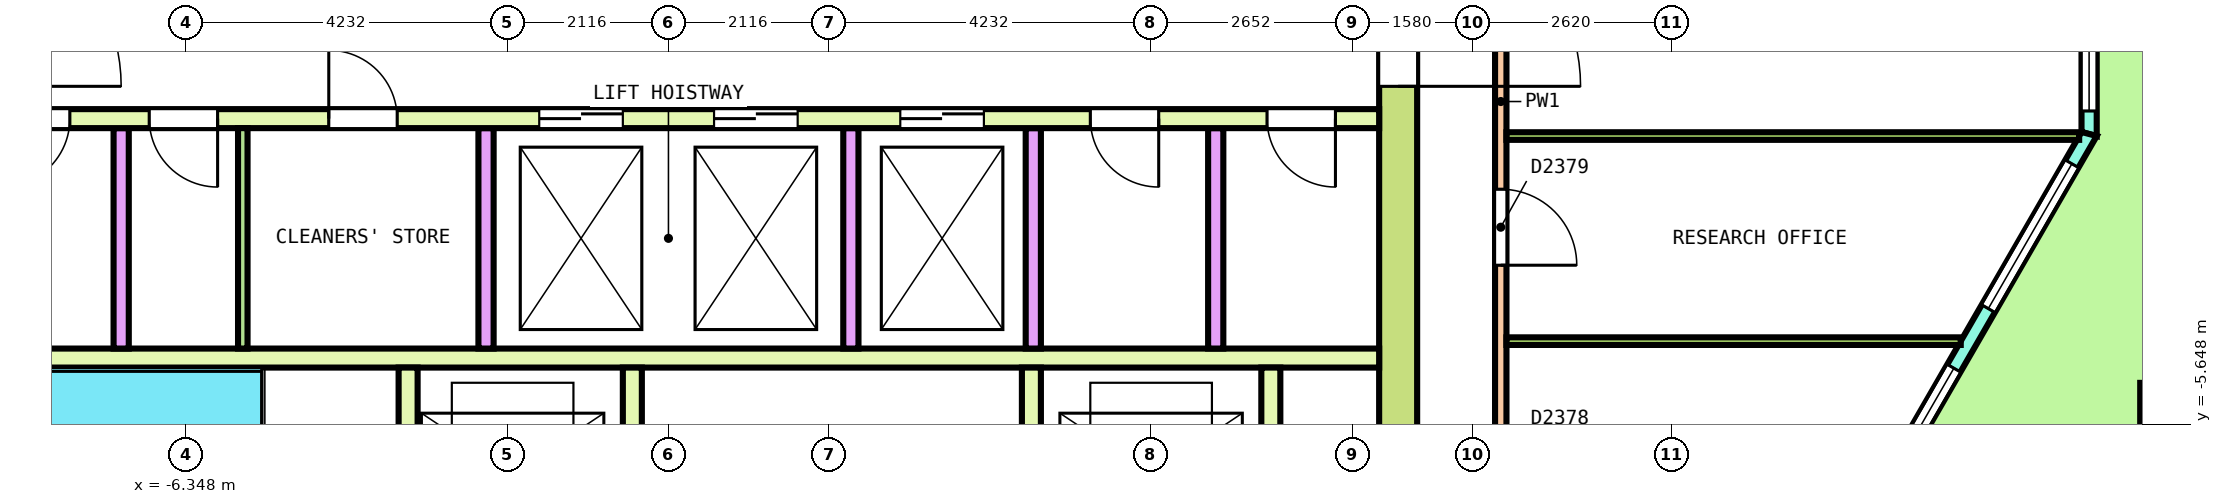
"""IFC4 building model, lengths in metres.
Left out: names, types, materials, properties, quantities, classifications, styles, units other than length and angle.
Written with IfcOpenShell. Run it as: python <this file> out.ifc"""

import sys

from ifc_helpers import new_model, si_unit, direction, frame, frame_2d, origin, origin_2d, place, context, subcontext, project, spatial, polyline, rectangle, outline, extrude, element, fill, save


model = new_model("IFC4")
c1 = context("Model", 3, precision=1e-05, world=origin(), true_north=direction((0.0, 1.0)))
c2 = subcontext(c1, "Body", "Model", "MODEL_VIEW")
j1 = project(units=[si_unit("LENGTHUNIT", "METRE"), si_unit("PLANEANGLEUNIT", "RADIAN")], contexts=[c1])
p1 = place(None, origin())
s1 = spatial("IfcSite", under=j1, at=p1, CompositionType="ELEMENT")
p2 = place(p1, origin())
s2 = spatial("IfcBuilding", under=s1, at=p2, CompositionType="ELEMENT")
p3 = place(p2, frame((0.0, 0.0, 328.6)))
s3 = spatial("IfcBuildingStorey", under=s2, at=p3, CompositionType="ELEMENT", Elevation=328.6)
p4 = place(p3, frame((19.788, -5.527, 0.0), z_axis=(0.010833557325, 0.018858414602, 0.999763469144), x_axis=(0.498285075857, 0.866740432575, -0.0217486946)))
e1 = element("IfcColumn", 1, at=p4, inside=s3, PredefinedType="COLUMN", context=c2, shape_type="SweptSolid", body=[
    extrude(rectangle(XDim=0.85, YDim=0.85, at=origin_2d()), origin(), (0.0, 0.0, 1.0), 3.651),
])
p5 = place(p3, frame((18.69, -1.827, 0.0), z_axis=(0.0, 0.0, 1.0), x_axis=(0.0, 1.0, 0.0)))
e2 = element("IfcWall", 2, at=p5, inside=s3, PredefinedType="SOLIDWALL", context=c2, shape_type="SweptSolid", body=[
    extrude(outline(polyline([(-0.027, -0.1), (1.214, -0.1), (2.456, -0.1), (3.697, -0.1), (4.938, -0.1), (4.885, 0.1), (3.67, 0.1), (2.456, 0.1), (1.241, 0.1), (0.027, 0.1), (-0.027, -0.1)])), origin(), (0.0, 0.0, 1.0), 3.7),
])
p6 = place(p5, frame((0.303, 0.0, 0.1)))
e3 = element("IfcOpeningElement", 3, at=p6, cuts=e2, PredefinedType="OPENING", context=c2, shape_type="SweptSolid", body=[
    extrude(rectangle(XDim=1.85, YDim=2.9, at=frame_2d((0.925, 1.45))), frame((0.0, 0.11, 0.0), z_axis=(0.0, -1.0, 0.0), x_axis=(1.0, 0.0, 0.0)), (0.0, 0.0, 1.0), 0.22),
])
p7 = place(p5, frame((2.759, 0.0, 0.1)))
e4 = element("IfcOpeningElement", 4, at=p7, cuts=e2, PredefinedType="OPENING", context=c2, shape_type="SweptSolid", body=[
    extrude(rectangle(XDim=1.85, YDim=2.9, at=frame_2d((0.925, 1.45))), frame((0.0, 0.11, 0.0), z_axis=(0.0, -1.0, 0.0), x_axis=(1.0, 0.0, 0.0)), (0.0, 0.0, 1.0), 0.22),
])
p8 = place(p3, frame((10.928, -15.273, 0.0), z_axis=(0.0, 0.0, 1.0), x_axis=(0.500001957507, 0.866024273614, 0.0)))
e5 = element("IfcWall", 5, at=p8, inside=s3, PredefinedType="SOLIDWALL", context=c2, shape_type="SweptSolid", body=[
    extrude(outline(polyline([(-0.027, -0.1), (1.012, -0.1), (2.05, -0.1), (3.089, -0.1), (4.128, -0.1), (5.166, -0.1), (6.205, -0.1), (7.243, -0.1), (8.282, -0.1), (9.321, -0.1), (10.359, -0.1), (11.398, -0.1), (12.437, -0.1), (13.475, -0.1), (14.514, -0.1), (15.552, -0.1), (15.499, 0.1), (14.467, 0.1), (13.436, 0.1), (12.404, 0.1), (11.373, 0.1), (10.341, 0.1), (9.31, 0.1), (8.278, 0.1), (7.247, 0.1), (6.216, 0.1), (5.184, 0.1), (4.153, 0.1), (3.121, 0.1), (2.09, 0.1), (1.058, 0.1), (0.027, 0.1), (-0.027, -0.1)])), origin(), (0.0, 0.0, 1.0), 3.7),
])
p9 = place(p8, frame((0.452, 0.0, 0.1)))
e6 = element("IfcOpeningElement", 6, at=p9, cuts=e5, PredefinedType="OPENING", context=c2, shape_type="SweptSolid", body=[
    extrude(rectangle(XDim=2.2, YDim=2.9, at=frame_2d((1.1, 1.45))), frame((0.0, 0.11, 0.0), z_axis=(0.0, -1.0, 0.0), x_axis=(1.0, 0.0, 0.0)), (0.0, 0.0, 1.0), 0.22),
])
p10 = place(p8, frame((3.558, 0.0, 0.1)))
e7 = element("IfcOpeningElement", 7, at=p10, cuts=e5, PredefinedType="OPENING", context=c2, shape_type="SweptSolid", body=[
    extrude(rectangle(XDim=2.2, YDim=2.9, at=frame_2d((1.1, 1.45))), frame((0.0, 0.11, 0.0), z_axis=(0.0, -1.0, 0.0), x_axis=(1.0, 0.0, 0.0)), (0.0, 0.0, 1.0), 0.22),
])
p11 = place(p8, frame((6.863, 0.0, 0.0)))
e8 = element("IfcOpeningElement", 8, at=p11, cuts=e5, PredefinedType="OPENING", context=c2, shape_type="SweptSolid", body=[
    extrude(rectangle(XDim=1.8, YDim=2.4, at=frame_2d((0.9, 1.2))), frame((0.0, 0.11, 0.0), z_axis=(0.0, -1.0, 0.0), x_axis=(1.0, 0.0, 0.0)), (0.0, 0.0, 1.0), 0.22),
])
p12 = place(p8, frame((6.863, 0.0, 2.55)))
e9 = element("IfcOpeningElement", 9, at=p12, cuts=e5, PredefinedType="OPENING", context=c2, shape_type="SweptSolid", body=[
    extrude(rectangle(XDim=1.8, YDim=0.45, at=frame_2d((0.9, 0.225))), frame((0.0, 0.11, 0.0), z_axis=(0.0, -1.0, 0.0), x_axis=(1.0, 0.0, 0.0)), (0.0, 0.0, 1.0), 0.22),
])
p13 = place(p8, frame((9.768, 0.0, 0.1)))
e10 = element("IfcOpeningElement", 10, at=p13, cuts=e5, PredefinedType="OPENING", context=c2, shape_type="SweptSolid", body=[
    extrude(rectangle(XDim=2.2, YDim=2.9, at=frame_2d((1.1, 1.45))), frame((0.0, 0.11, 0.0), z_axis=(0.0, -1.0, 0.0), x_axis=(1.0, 0.0, 0.0)), (0.0, 0.0, 1.0), 0.22),
])
p14 = place(p8, frame((12.873, 0.0, 0.1)))
e11 = element("IfcOpeningElement", 11, at=p14, cuts=e5, PredefinedType="OPENING", context=c2, shape_type="SweptSolid", body=[
    extrude(rectangle(XDim=2.2, YDim=2.9, at=frame_2d((1.1, 1.45))), frame((0.0, 0.11, 0.0), z_axis=(0.0, -1.0, 0.0), x_axis=(1.0, 0.0, 0.0)), (0.0, 0.0, 1.0), 0.22),
])
p15 = place(p3, frame((9.6, -7.85, 0.0), z_axis=(0.0, 0.0, 1.0), x_axis=(0.0, 1.0, 0.0)))
e12 = element("IfcWall", 12, at=p15, inside=s3, PredefinedType="SHEAR", context=c2, shape_type="SweptSolid", body=[
    extrude(rectangle(XDim=15.7, YDim=0.5, at=frame_2d((7.85, 0.0))), origin(), (0.0, 0.0, 1.0), 3.7),
])
p16 = place(p15, frame((6.65, 0.0, 0.0)))
e13 = element("IfcOpeningElement", 13, at=p16, cuts=e12, PredefinedType="OPENING", context=c2, shape_type="SweptSolid", body=[
    extrude(rectangle(XDim=2.4, YDim=2.1, at=frame_2d((1.2, 1.05))), frame((0.0, 0.26, 0.0), z_axis=(0.0, -1.0, 0.0), x_axis=(1.0, 0.0, 0.0)), (0.0, 0.0, 1.0), 0.52),
])
p17 = place(p15, frame((13.55, 0.0, 0.0)))
e14 = element("IfcOpeningElement", 14, at=p17, cuts=e12, PredefinedType="OPENING", context=c2, shape_type="SweptSolid", body=[
    extrude(rectangle(XDim=1.2, YDim=2.1, at=frame_2d((0.6, 1.05))), frame((0.0, 0.26, 0.0), z_axis=(0.0, -1.0, 0.0), x_axis=(1.0, 0.0, 0.0)), (0.0, 0.0, 1.0), 0.52),
])
p18 = place(p15, frame((1.05, 0.0, 0.0)))
e15 = element("IfcOpeningElement", 15, at=p18, cuts=e12, PredefinedType="OPENING", context=c2, shape_type="SweptSolid", body=[
    extrude(rectangle(XDim=1.0, YDim=2.1, at=frame_2d((0.5, 1.05))), frame((0.0, 0.26, 0.0), z_axis=(0.0, -1.0, 0.0), x_axis=(1.0, 0.0, 0.0)), (0.0, 0.0, 1.0), 0.52),
])
p19 = place(p3, frame((-9.35, -1.625, 0.0), z_axis=(0.0, 0.0, 1.0), x_axis=(1.0, 0.0, 0.0)))
e16 = element("IfcWall", 16, at=p19, inside=s3, PredefinedType="SOLIDWALL", context=c2, shape_type="SweptSolid", body=[
    extrude(rectangle(XDim=18.7, YDim=0.25, at=frame_2d((9.35, 0.0))), origin(), (0.0, 0.0, 1.0), 3.7),
])
p20 = place(p19, frame((7.65, 0.0, 0.0)))
e17 = element("IfcOpeningElement", 17, at=p20, cuts=e16, PredefinedType="OPENING", context=c2, shape_type="SweptSolid", body=[
    extrude(rectangle(XDim=1.1, YDim=2.1, at=frame_2d((0.55, 1.05))), frame((0.0, 0.135, 0.0), z_axis=(0.0, -1.0, 0.0), x_axis=(1.0, 0.0, 0.0)), (0.0, 0.0, 1.0), 0.27),
])
p21 = place(p19, frame((9.95, 0.0, 0.0)))
e18 = element("IfcOpeningElement", 18, at=p21, cuts=e16, PredefinedType="OPENING", context=c2, shape_type="SweptSolid", body=[
    extrude(rectangle(XDim=1.1, YDim=2.1, at=frame_2d((0.55, 1.05))), frame((0.0, 0.135, 0.0), z_axis=(0.0, -1.0, 0.0), x_axis=(1.0, 0.0, 0.0)), (0.0, 0.0, 1.0), 0.27),
])
p22 = place(p19, frame((12.4, 0.0, 0.0)))
e19 = element("IfcOpeningElement", 19, at=p22, cuts=e16, PredefinedType="OPENING", context=c2, shape_type="SweptSolid", body=[
    extrude(rectangle(XDim=1.1, YDim=2.1, at=frame_2d((0.55, 1.05))), frame((0.0, 0.135, 0.0), z_axis=(0.0, -1.0, 0.0), x_axis=(1.0, 0.0, 0.0)), (0.0, 0.0, 1.0), 0.27),
])
p23 = place(p19, frame((0.575, 0.0, 0.0)))
e20 = element("IfcOpeningElement", 20, at=p23, cuts=e16, PredefinedType="OPENING", context=c2, shape_type="SweptSolid", body=[
    extrude(rectangle(XDim=0.9, YDim=2.1, at=frame_2d((0.45, 1.05))), frame((0.0, 0.135, 0.0), z_axis=(0.0, -1.0, 0.0), x_axis=(1.0, 0.0, 0.0)), (0.0, 0.0, 1.0), 0.27),
])
p24 = place(p19, frame((2.519, 0.0, 0.0)))
e21 = element("IfcOpeningElement", 21, at=p24, cuts=e16, PredefinedType="OPENING", context=c2, shape_type="SweptSolid", body=[
    extrude(rectangle(XDim=0.9, YDim=2.1, at=frame_2d((0.45, 1.05))), frame((0.0, 0.135, 0.0), z_axis=(0.0, -1.0, 0.0), x_axis=(1.0, 0.0, 0.0)), (0.0, 0.0, 1.0), 0.27),
])
p25 = place(p19, frame((4.881, 0.0, 0.0)))
e22 = element("IfcOpeningElement", 22, at=p25, cuts=e16, PredefinedType="OPENING", context=c2, shape_type="SweptSolid", body=[
    extrude(rectangle(XDim=0.9, YDim=2.1, at=frame_2d((0.45, 1.05))), frame((0.0, 0.135, 0.0), z_axis=(0.0, -1.0, 0.0), x_axis=(1.0, 0.0, 0.0)), (0.0, 0.0, 1.0), 0.27),
])
p26 = place(p19, frame((14.9, 0.0, 0.0)))
e23 = element("IfcOpeningElement", 23, at=p26, cuts=e16, PredefinedType="OPENING", context=c2, shape_type="SweptSolid", body=[
    extrude(rectangle(XDim=0.9, YDim=2.1, at=frame_2d((0.45, 1.05))), frame((0.0, 0.135, 0.0), z_axis=(0.0, -1.0, 0.0), x_axis=(1.0, 0.0, 0.0)), (0.0, 0.0, 1.0), 0.27),
])
p27 = place(p19, frame((17.225, 0.0, 0.0)))
e24 = element("IfcOpeningElement", 24, at=p27, cuts=e16, PredefinedType="OPENING", context=c2, shape_type="SweptSolid", body=[
    extrude(rectangle(XDim=0.9, YDim=2.1, at=frame_2d((0.45, 1.05))), frame((0.0, 0.135, 0.0), z_axis=(0.0, -1.0, 0.0), x_axis=(1.0, 0.0, 0.0)), (0.0, 0.0, 1.0), 0.27),
])
p28 = place(p3, frame((-9.35, -4.775, 0.0), z_axis=(0.0, 0.0, 1.0), x_axis=(1.0, 0.0, 0.0)))
e25 = element("IfcWall", 25, at=p28, inside=s3, PredefinedType="SOLIDWALL", context=c2, shape_type="SweptSolid", body=[
    extrude(rectangle(XDim=18.7, YDim=0.25, at=frame_2d((9.35, 0.0))), origin(), (0.0, 0.0, 1.0), 3.7),
])
for number, where, z_axis, x_axis in (
    (26, (-7.2, -4.65, 0.0), (0.0, 0.0, 1.0), (0.0, 1.0, 0.0)),
    (27, (-2.4, -4.65, 0.0), (0.0, 0.0, 1.0), (0.0, 1.0, 0.0)),
    (28, (2.4, -4.65, 0.0), (0.0, 0.0, 1.0), (0.0, 1.0, 0.0)),
    (29, (4.8, -4.65, 0.0), (0.0, 0.0, 1.0), (0.0, 1.0, 0.0)),
    (30, (7.2, -4.65, 0.0), (0.0, 0.0, 1.0), (0.0, 1.0, 0.0)),
):
    element("IfcWall", number, at=place(p3, frame(where, z_axis=z_axis, x_axis=x_axis)), inside=s3, PredefinedType="SOLIDWALL", context=c2, shape_type="SweptSolid", body=[
        extrude(rectangle(XDim=2.9, YDim=0.2, at=frame_2d((1.45, 0.0))), origin(), (0.0, 0.0, 1.0), 3.7),
    ])
p29 = place(p3, frame((-3.425, -7.85, 0.0), z_axis=(0.0, 0.0, 1.0), x_axis=(0.0, 1.0, 0.0)))
e31 = element("IfcWall", 31, at=p29, inside=s3, PredefinedType="SOLIDWALL", context=c2, shape_type="SweptSolid", body=[
    extrude(rectangle(XDim=2.95, YDim=0.25, at=frame_2d((1.475, 0.0))), origin(), (0.0, 0.0, 1.0), 3.7),
])
p30 = place(p3, frame((-0.475, -7.85, 0.0), z_axis=(0.0, 0.0, 1.0), x_axis=(0.0, 1.0, 0.0)))
e32 = element("IfcWall", 32, at=p30, inside=s3, PredefinedType="SOLIDWALL", context=c2, shape_type="SweptSolid", body=[
    extrude(rectangle(XDim=2.95, YDim=0.25, at=frame_2d((1.475, 0.0))), origin(), (0.0, 0.0, 1.0), 3.7),
])
p31 = place(p30, frame((0.925, 0.0, 0.0)))
e33 = element("IfcOpeningElement", 33, at=p31, cuts=e32, PredefinedType="OPENING", context=c2, shape_type="SweptSolid", body=[
    extrude(rectangle(XDim=1.1, YDim=2.1, at=frame_2d((0.55, 1.05))), frame((0.0, 0.135, 0.0), z_axis=(0.0, -1.0, 0.0), x_axis=(1.0, 0.0, 0.0)), (0.0, 0.0, 1.0), 0.27),
])
p32 = place(p3, frame((4.775, -7.85, 0.0), z_axis=(0.0, 0.0, 1.0), x_axis=(0.0, 1.0, 0.0)))
e34 = element("IfcWall", 34, at=p32, inside=s3, PredefinedType="SOLIDWALL", context=c2, shape_type="SweptSolid", body=[
    extrude(rectangle(XDim=2.95, YDim=0.25, at=frame_2d((1.475, 0.0))), origin(), (0.0, 0.0, 1.0), 3.7),
])
p33 = place(p32, frame((0.925, 0.0, 0.0)))
e35 = element("IfcOpeningElement", 35, at=p33, cuts=e34, PredefinedType="OPENING", context=c2, shape_type="SweptSolid", body=[
    extrude(rectangle(XDim=1.1, YDim=2.1, at=frame_2d((0.55, 1.05))), frame((0.0, 0.135, 0.0), z_axis=(0.0, -1.0, 0.0), x_axis=(1.0, 0.0, 0.0)), (0.0, 0.0, 1.0), 0.27),
])
p34 = place(p3, frame((7.925, -7.85, 0.0), z_axis=(0.0, 0.0, 1.0), x_axis=(0.0, 1.0, 0.0)))
e36 = element("IfcWall", 36, at=p34, inside=s3, PredefinedType="SOLIDWALL", context=c2, shape_type="SweptSolid", body=[
    extrude(rectangle(XDim=2.95, YDim=0.25, at=frame_2d((1.475, 0.0))), origin(), (0.0, 0.0, 1.0), 3.7),
])
p35 = place(p3, frame((-5.6, -4.65, 0.0), z_axis=(0.0, 0.0, 1.0), x_axis=(0.0, 1.0, 0.0)))
e37 = element("IfcWall", 37, at=p35, inside=s3, PredefinedType="PARTITIONING", context=c2, shape_type="SweptSolid", body=[
    extrude(rectangle(XDim=2.9, YDim=0.125, at=frame_2d((1.45, 0.0))), origin(), (0.0, 0.0, 1.0), 3.7),
])
p36 = place(p3, frame((10.95, -9.975, 0.0), z_axis=(0.0, 0.0, 1.0), x_axis=(0.0, 1.0, 0.0)))
e38 = element("IfcWall", 38, at=p36, inside=s3, PredefinedType="PARTITIONING", context=c2, shape_type="SweptSolid", body=[
    extrude(rectangle(XDim=17.15, YDim=0.15, at=frame_2d((8.575, 0.0))), origin(), (0.0, 0.0, 1.0), 3.05),
])
p37 = place(p36, frame((10.593, 0.0, 0.0)))
e39 = element("IfcOpeningElement", 39, at=p37, cuts=e38, PredefinedType="OPENING", context=c2, shape_type="SweptSolid", body=[
    extrude(rectangle(XDim=1.0, YDim=2.1, at=frame_2d((0.5, 1.05))), frame((0.0, 0.085, 0.0), z_axis=(0.0, -1.0, 0.0), x_axis=(1.0, 0.0, 0.0)), (0.0, 0.0, 1.0), 0.17),
])
p38 = place(p36, frame((3.123, 0.0, 0.0)))
e40 = element("IfcOpeningElement", 40, at=p38, cuts=e38, PredefinedType="OPENING", context=c2, shape_type="SweptSolid", body=[
    extrude(rectangle(XDim=1.0, YDim=2.1, at=frame_2d((0.5, 1.05))), frame((0.0, 0.085, 0.0), z_axis=(0.0, -1.0, 0.0), x_axis=(1.0, 0.0, 0.0)), (0.0, 0.0, 1.0), 0.17),
])
p39 = place(p36, frame((6.421, 0.0, 0.0)))
e41 = element("IfcOpeningElement", 41, at=p39, cuts=e38, PredefinedType="OPENING", context=c2, shape_type="SweptSolid", body=[
    extrude(rectangle(XDim=1.0, YDim=2.1, at=frame_2d((0.5, 1.05))), frame((0.0, 0.085, 0.0), z_axis=(0.0, -1.0, 0.0), x_axis=(1.0, 0.0, 0.0)), (0.0, 0.0, 1.0), 0.17),
])
p40 = place(p3, frame((11.025, -1.854, 0.0), z_axis=(0.0, 0.0, 1.0), x_axis=(1.0, 0.0, 0.0)))
e42 = element("IfcWall", 42, at=p40, inside=s3, PredefinedType="PARTITIONING", context=c2, shape_type="SweptSolid", body=[
    extrude(rectangle(XDim=7.535, YDim=0.1, at=frame_2d((3.767, 0.0))), origin(), (0.0, 0.0, 1.0), 3.05),
])
p41 = place(p3, frame((11.025, -4.552, 0.0), z_axis=(0.0, 0.0, 1.0), x_axis=(1.0, 0.0, 0.0)))
e43 = element("IfcWall", 43, at=p41, inside=s3, PredefinedType="PARTITIONING", context=c2, shape_type="SweptSolid", body=[
    extrude(rectangle(XDim=5.977, YDim=0.1, at=frame_2d((2.988, 0.0))), origin(), (0.0, 0.0, 1.0), 3.05),
])
p42 = place(p6, origin())
e44 = element("IfcWindow", 44, at=p42, inside=s3, PartitioningType="SINGLE_PANEL", PredefinedType="WINDOW", context=c2, shape_type="SweptSolid", body=[
    extrude(rectangle(XDim=1.85, YDim=2.9, at=frame_2d((0.925, 1.45))), frame((0.0, 0.03, 0.0), z_axis=(0.0, -1.0, 0.0), x_axis=(1.0, 0.0, 0.0)), (0.0, 0.0, 1.0), 0.06),
])
fill(e3, e44)
p43 = place(p13, origin())
e45 = element("IfcWindow", 45, at=p43, inside=s3, PartitioningType="SINGLE_PANEL", PredefinedType="WINDOW", context=c2, shape_type="SweptSolid", body=[
    extrude(rectangle(XDim=2.2, YDim=2.9, at=frame_2d((1.1, 1.45))), frame((0.0, 0.03, 0.0), z_axis=(0.0, -1.0, 0.0), x_axis=(1.0, 0.0, 0.0)), (0.0, 0.0, 1.0), 0.06),
])
fill(e10, e45)
p44 = place(p14, origin())
e46 = element("IfcWindow", 46, at=p44, inside=s3, PartitioningType="SINGLE_PANEL", PredefinedType="WINDOW", context=c2, shape_type="SweptSolid", body=[
    extrude(rectangle(XDim=2.2, YDim=2.9, at=frame_2d((1.1, 1.45))), frame((0.0, 0.03, 0.0), z_axis=(0.0, -1.0, 0.0), x_axis=(1.0, 0.0, 0.0)), (0.0, 0.0, 1.0), 0.06),
])
fill(e11, e46)
p45 = place(p20, origin())
e47 = element("IfcDoor", 47, at=p45, inside=s3, OperationType="DOUBLE_DOOR_SLIDING", PredefinedType="DOOR", context=c2, shape_type="SweptSolid", body=[
    extrude(rectangle(XDim=1.1, YDim=2.1, at=frame_2d((0.55, 1.05))), frame((0.0, 0.075, 0.0), z_axis=(0.0, -1.0, 0.0), x_axis=(1.0, 0.0, 0.0)), (0.0, 0.0, 1.0), 0.15),
])
fill(e17, e47)
p46 = place(p21, origin())
e48 = element("IfcDoor", 48, at=p46, inside=s3, OperationType="DOUBLE_DOOR_SLIDING", PredefinedType="DOOR", context=c2, shape_type="SweptSolid", body=[
    extrude(rectangle(XDim=1.1, YDim=2.1, at=frame_2d((0.55, 1.05))), frame((0.0, 0.075, 0.0), z_axis=(0.0, -1.0, 0.0), x_axis=(1.0, 0.0, 0.0)), (0.0, 0.0, 1.0), 0.15),
])
fill(e18, e48)
p47 = place(p22, origin())
e49 = element("IfcDoor", 49, at=p47, inside=s3, OperationType="DOUBLE_DOOR_SLIDING", PredefinedType="DOOR", context=c2, shape_type="SweptSolid", body=[
    extrude(rectangle(XDim=1.1, YDim=2.1, at=frame_2d((0.55, 1.05))), frame((0.0, 0.075, 0.0), z_axis=(0.0, -1.0, 0.0), x_axis=(1.0, 0.0, 0.0)), (0.0, 0.0, 1.0), 0.15),
])
fill(e19, e49)
p48 = place(p16, origin())
e50 = element("IfcDoor", 50, at=p48, inside=s3, OperationType="DOUBLE_DOOR_SINGLE_SWING", PredefinedType="DOOR", context=c2, shape_type="SweptSolid", body=[
    extrude(rectangle(XDim=2.4, YDim=2.1, at=frame_2d((1.2, 1.05))), frame((0.0, 0.2, 0.0), z_axis=(0.0, -1.0, 0.0), x_axis=(1.0, 0.0, 0.0)), (0.0, 0.0, 1.0), 0.4),
])
fill(e13, e50)
p49 = place(p23, origin())
e51 = element("IfcDoor", 51, at=p49, inside=s3, OperationType="SINGLE_SWING_LEFT", PredefinedType="DOOR", context=c2, shape_type="SweptSolid", body=[
    extrude(rectangle(XDim=0.9, YDim=2.1, at=frame_2d((0.45, 1.05))), frame((0.0, 0.075, 0.0), z_axis=(0.0, -1.0, 0.0), x_axis=(1.0, 0.0, 0.0)), (0.0, 0.0, 1.0), 0.15),
])
fill(e20, e51)
p50 = place(p24, origin())
e52 = element("IfcDoor", 52, at=p50, inside=s3, OperationType="SINGLE_SWING_RIGHT", PredefinedType="DOOR", context=c2, shape_type="SweptSolid", body=[
    extrude(rectangle(XDim=0.9, YDim=2.1, at=frame_2d((0.45, 1.05))), frame((0.0, 0.075, 0.0), z_axis=(0.0, -1.0, 0.0), x_axis=(1.0, 0.0, 0.0)), (0.0, 0.0, 1.0), 0.15),
])
fill(e21, e52)
p51 = place(p25, origin())
e53 = element("IfcDoor", 53, at=p51, inside=s3, OperationType="SINGLE_SWING_LEFT", PredefinedType="DOOR", context=c2, shape_type="SweptSolid", body=[
    extrude(rectangle(XDim=0.9, YDim=2.1, at=frame_2d((0.45, 1.05))), frame((0.0, 0.075, 0.0), z_axis=(0.0, -1.0, 0.0), x_axis=(1.0, 0.0, 0.0)), (0.0, 0.0, 1.0), 0.15),
])
fill(e22, e53)
p52 = place(p26, origin())
e54 = element("IfcDoor", 54, at=p52, inside=s3, OperationType="SINGLE_SWING_RIGHT", PredefinedType="DOOR", context=c2, shape_type="SweptSolid", body=[
    extrude(rectangle(XDim=0.9, YDim=2.1, at=frame_2d((0.45, 1.05))), frame((0.0, 0.075, 0.0), z_axis=(0.0, -1.0, 0.0), x_axis=(1.0, 0.0, 0.0)), (0.0, 0.0, 1.0), 0.15),
])
fill(e23, e54)
p53 = place(p27, origin())
e55 = element("IfcDoor", 55, at=p53, inside=s3, OperationType="SINGLE_SWING_LEFT", PredefinedType="DOOR", context=c2, shape_type="SweptSolid", body=[
    extrude(rectangle(XDim=0.9, YDim=2.1, at=frame_2d((0.45, 1.05))), frame((0.0, 0.075, 0.0), z_axis=(0.0, -1.0, 0.0), x_axis=(1.0, 0.0, 0.0)), (0.0, 0.0, 1.0), 0.15),
])
fill(e24, e55)
p54 = place(p39, origin())
e56 = element("IfcDoor", 56, at=p54, inside=s3, OperationType="SINGLE_SWING_LEFT", PredefinedType="DOOR", context=c2, shape_type="SweptSolid", body=[
    extrude(rectangle(XDim=1.0, YDim=2.1, at=frame_2d((0.5, 1.05))), frame((0.0, 0.025, 0.0), z_axis=(0.0, -1.0, 0.0), x_axis=(1.0, 0.0, 0.0)), (0.0, 0.0, 1.0), 0.05),
])
fill(e41, e56)
save(model, sys.argv[1])
